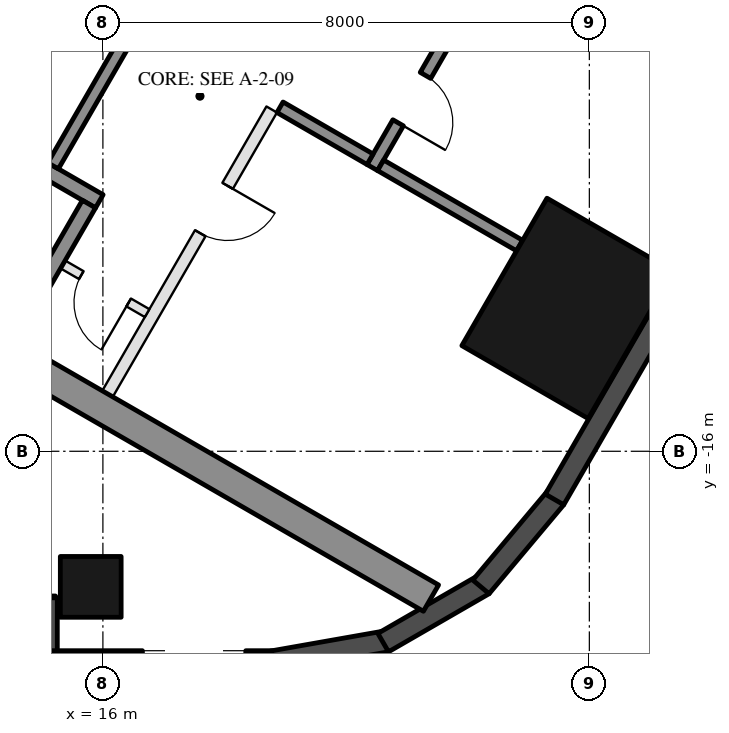
"""IFC4 building model, lengths in metres.
Left out: names, types, materials, properties, quantities, classifications, styles, units other than length and angle.
Written with IfcOpenShell. Run it as: python <this file> out.ifc"""

import sys

from ifc_helpers import new_model, si_unit, direction, frame, frame_2d, origin, origin_2d, place, context, subcontext, project, spatial, rectangle, hollow_rectangle, extrude, element, fill, save


model = new_model("IFC4")
c1 = context("Model", 3, precision=1e-05, world=origin(), true_north=direction((0.0, 1.0)))
c2 = subcontext(c1, "Body", "Model", "MODEL_VIEW")
j1 = project(units=[si_unit("LENGTHUNIT", "METRE"), si_unit("PLANEANGLEUNIT", "RADIAN")], contexts=[c1])
p1 = place(None, origin())
s1 = spatial("IfcSite", under=j1, at=p1, CompositionType="ELEMENT")
p2 = place(p1, origin())
s2 = spatial("IfcBuilding", under=s1, at=p2, CompositionType="ELEMENT")
p3 = place(p2, frame((0.0, 0.0, 46.5)))
s3 = spatial("IfcBuildingStorey", under=s2, at=p3, CompositionType="ELEMENT", Elevation=46.5)
p4 = place(p3, frame((15.8, -18.23, 0.0), z_axis=(0.0, 0.0, 1.0), x_axis=(-1.0, 0.0, 0.0)))
e1 = element("IfcColumn", 1, at=p4, inside=s3, PredefinedType="COLUMN", context=c2, shape_type="SweptSolid", body=[
    extrude(hollow_rectangle(XDim=1.0, YDim=1.0, WallThickness=0.045, at=origin_2d()), origin(), (0.0, 0.0, 1.0), 3.7),
])
p5 = place(p3, frame((23.643, -13.65, 0.0), z_axis=(0.0, 0.0, 1.0), x_axis=(0.5, 0.866025403784, 0.0)))
e2 = element("IfcColumn", 2, at=p5, inside=s3, PredefinedType="COLUMN", context=c2, shape_type="SweptSolid", body=[
    extrude(hollow_rectangle(XDim=2.8, YDim=2.4, WallThickness=0.07, at=origin_2d()), origin(), (0.0, 0.0, 1.0), 3.7),
])
p6 = place(p3, frame((8.48, -18.555, 0.0), z_axis=(0.0, 0.0, 1.0), x_axis=(1.0, 0.0, 0.0)))
e3 = element("IfcWall", 3, at=p6, inside=s3, PredefinedType="SOLIDWALL", context=c2, shape_type="SweptSolid", body=[
    extrude(rectangle(XDim=6.74, YDim=0.35, at=frame_2d((3.37, 0.0))), origin(), (0.0, 0.0, 1.0), 3.55),
])
p7 = place(p6, frame((0.77, 0.0, 0.0)))
e4 = element("IfcOpeningElement", 4, at=p7, cuts=e3, PredefinedType="OPENING", context=c2, shape_type="SweptSolid", body=[
    extrude(rectangle(XDim=2.4, YDim=2.4, at=frame_2d((1.2, 1.2))), frame((0.0, 0.185, 0.0), z_axis=(0.0, -1.0, 0.0), x_axis=(1.0, 0.0, 0.0)), (0.0, 0.0, 1.0), 0.37),
])
p8 = place(p6, frame((3.47, 0.0, 0.3)))
e5 = element("IfcOpeningElement", 5, at=p8, cuts=e3, PredefinedType="OPENING", context=c2, shape_type="SweptSolid", body=[
    extrude(rectangle(XDim=2.5, YDim=2.65, at=frame_2d((1.25, 1.325))), frame((0.0, 0.185, 0.0), z_axis=(0.0, -1.0, 0.0), x_axis=(1.0, 0.0, 0.0)), (0.0, 0.0, 1.0), 0.37),
])
p9 = place(p3, frame((15.075, -18.41, 0.0), z_axis=(0.0, 0.0, 1.0), x_axis=(0.0, -1.0, 0.0)))
e6 = element("IfcWall", 6, at=p9, inside=s3, PredefinedType="SOLIDWALL", context=c2, shape_type="SweptSolid", body=[
    extrude(rectangle(XDim=1.22, YDim=0.35, at=frame_2d((0.61, 0.0))), origin(), (0.0, 0.0, 1.0), 3.55),
])
p10 = place(p3, frame((14.9, -19.455, 0.0), z_axis=(0.0, 0.0, 1.0), x_axis=(1.0, 0.0, 0.0)))
e7 = element("IfcWall", 7, at=p10, inside=s3, PredefinedType="SOLIDWALL", context=c2, shape_type="SweptSolid", body=[
    extrude(rectangle(XDim=3.916, YDim=0.35, at=frame_2d((1.958, 0.0))), origin(), (0.0, 0.0, 1.0), 3.55),
])
p11 = place(p10, frame((1.75, 0.0, 0.3)))
e8 = element("IfcOpeningElement", 8, at=p11, cuts=e7, PredefinedType="OPENING", context=c2, shape_type="SweptSolid", body=[
    extrude(rectangle(XDim=1.7, YDim=2.65, at=frame_2d((0.85, 1.325))), frame((0.0, 0.185, 0.0), z_axis=(0.0, -1.0, 0.0), x_axis=(1.0, 0.0, 0.0)), (0.0, 0.0, 1.0), 0.37),
])
p12 = place(p3, frame((18.785, -19.458, 0.0), z_axis=(0.0, 0.0, 1.0), x_axis=(0.984798995425, 0.173697837091, 0.0)))
e9 = element("IfcWall", 9, at=p12, inside=s3, PredefinedType="SOLIDWALL", context=c2, shape_type="SweptSolid", body=[
    extrude(rectangle(XDim=1.91, YDim=0.35, at=frame_2d((0.955, 0.0))), origin(), (0.0, 0.0, 1.0), 3.55),
])
for number, where, z_axis, x_axis in (
    (10, (20.61, -19.147, 0.0), (0.0, 0.0, 1.0), (0.866, 0.5, 0.0)),
    (11, (22.217, -18.231, 0.0), (0.0, 0.0, 1.0), (0.643, 0.766, 0.0)),
):
    element("IfcWall", number, at=place(p3, frame(where, z_axis=z_axis, x_axis=x_axis)), inside=s3, PredefinedType="SOLIDWALL", context=c2, shape_type="SweptSolid", body=[
        extrude(rectangle(XDim=1.91, YDim=0.35, at=frame_2d((0.955, 0.0))), origin(), (0.0, 0.0, 1.0), 3.55),
    ])
p13 = place(p3, frame((23.427, -16.792, 0.0), z_axis=(0.0, 0.0, 1.0), x_axis=(0.500018773155, 0.866014564827, 0.0)))
e12 = element("IfcWall", 12, at=p13, inside=s3, PredefinedType="SOLIDWALL", context=c2, shape_type="SweptSolid", body=[
    extrude(rectangle(XDim=5.658, YDim=0.35, at=frame_2d((2.829, 0.0))), origin(), (0.0, 0.0, 1.0), 3.55),
])
for number, where, z_axis, x_axis in (
    (13, (8.547, -10.997, 0.0), (0.0, 0.0, 1.0), (0.866, -0.5, 0.0)),
    (14, (13.797, -1.903, 0.0), (0.0, 0.0, 1.0), (0.866, -0.5, 0.0)),
):
    element("IfcWall", number, at=place(p3, frame(where, z_axis=z_axis, x_axis=x_axis)), inside=s3, PredefinedType="SHEAR", context=c2, shape_type="SweptSolid", body=[
        extrude(rectangle(XDim=14.837, YDim=0.5, at=frame_2d((7.418, 0.0))), origin(), (0.0, 0.0, 1.0), 3.5),
    ])
p14 = place(p3, frame((10.356, -8.664, 0.0), z_axis=(0.0, 0.0, 1.0), x_axis=(0.866028629588, -0.499994412703, 0.0)))
e15 = element("IfcWall", 15, at=p14, inside=s3, PredefinedType="SHEAR", context=c2, shape_type="SweptSolid", body=[
    extrude(rectangle(XDim=6.45, YDim=0.25, at=frame_2d((3.225, 0.0))), origin(), (0.0, 0.0, 1.0), 3.5),
])
p15 = place(p14, frame((0.3, 0.0, 0.0)))
e16 = element("IfcOpeningElement", 16, at=p15, cuts=e15, PredefinedType="OPENING", context=c2, shape_type="SweptSolid", body=[
    extrude(rectangle(XDim=1.0, YDim=2.1, at=frame_2d((0.5, 1.05))), frame((0.0, 0.135, 0.0), z_axis=(0.0, -1.0, 0.0), x_axis=(1.0, 0.0, 0.0)), (0.0, 0.0, 1.0), 0.27),
])
p16 = place(p3, frame((14.496, -14.143, 0.0), z_axis=(0.0, 0.0, 1.0), x_axis=(0.500062241894, 0.865989465428, 0.0)))
e17 = element("IfcWall", 17, at=p16, inside=s3, PredefinedType="SHEAR", context=c2, shape_type="SweptSolid", body=[
    extrude(rectangle(XDim=2.55, YDim=0.25, at=frame_2d((1.275, 0.0))), origin(), (0.0, 0.0, 1.0), 3.5),
])
p17 = place(p3, frame((15.181, -11.305, 0.0), z_axis=(0.0, 0.0, 1.0), x_axis=(0.49994636267, 0.866056369097, 0.0)))
e18 = element("IfcWall", 18, at=p17, inside=s3, PredefinedType="SHEAR", context=c2, shape_type="SweptSolid", body=[
    extrude(rectangle(XDim=2.8, YDim=0.2, at=frame_2d((1.4, 0.0))), origin(), (0.0, 0.0, 1.0), 3.5),
])
p18 = place(p3, frame((20.43, -11.333, 0.0), z_axis=(0.0, 0.0, 1.0), x_axis=(0.500001309137, 0.866024647952, 0.0)))
e19 = element("IfcWall", 19, at=p18, inside=s3, PredefinedType="SHEAR", context=c2, shape_type="SweptSolid", body=[
    extrude(rectangle(XDim=2.4, YDim=0.2, at=frame_2d((1.2, 0.0))), origin(), (0.0, 0.0, 1.0), 3.5),
])
p19 = place(p18, frame((0.85, 0.0, 0.0)))
e20 = element("IfcOpeningElement", 20, at=p19, cuts=e19, PredefinedType="OPENING", context=c2, shape_type="SweptSolid", body=[
    extrude(rectangle(XDim=0.9, YDim=2.1, at=frame_2d((0.45, 1.05))), frame((0.0, 0.11, 0.0), z_axis=(0.0, -1.0, 0.0), x_axis=(1.0, 0.0, 0.0)), (0.0, 0.0, 1.0), 0.22),
])
p20 = place(p3, frame((18.913, -10.342, 0.0), z_axis=(0.0, 0.0, 1.0), x_axis=(0.866038183914, -0.499977863513, 0.0)))
e21 = element("IfcWall", 21, at=p20, inside=s3, PredefinedType="SHEAR", context=c2, shape_type="SweptSolid", body=[
    extrude(rectangle(XDim=1.71, YDim=0.2, at=frame_2d((0.855, 0.0))), origin(), (0.0, 0.0, 1.0), 3.5),
])
p21 = place(p3, frame((20.567, -11.297, 0.0), z_axis=(0.0, 0.0, 1.0), x_axis=(0.866060851709, -0.499938597367, 0.0)))
e22 = element("IfcWall", 22, at=p21, inside=s3, PredefinedType="SHEAR", context=c2, shape_type="SweptSolid", body=[
    extrude(rectangle(XDim=2.64, YDim=0.2, at=frame_2d((1.32, 0.0))), origin(), (0.0, 0.0, 1.0), 3.5),
])
p22 = place(p3, frame((16.076, -15.055, 0.0), z_axis=(0.0, 0.0, 1.0), x_axis=(0.499995103361, 0.866028230842, 0.0)))
e23 = element("IfcWall", 23, at=p22, inside=s3, PredefinedType="PARTITIONING", context=c2, shape_type="SweptSolid", body=[
    extrude(rectangle(XDim=5.4, YDim=0.2, at=frame_2d((2.7, 0.0))), origin(), (0.0, 0.0, 1.0), 3.5),
])
p23 = place(p22, frame((3.05, 0.0, 0.0)))
e24 = element("IfcOpeningElement", 24, at=p23, cuts=e23, PredefinedType="OPENING", context=c2, shape_type="SweptSolid", body=[
    extrude(rectangle(XDim=0.9, YDim=2.1, at=frame_2d((0.45, 1.05))), frame((0.0, 0.11, 0.0), z_axis=(0.0, -1.0, 0.0), x_axis=(1.0, 0.0, 0.0)), (0.0, 0.0, 1.0), 0.22),
])
p24 = place(p3, frame((15.342, -12.928, 0.0), z_axis=(0.0, 0.0, 1.0), x_axis=(0.865989903783, -0.500061482766, 0.0)))
e25 = element("IfcWall", 25, at=p24, inside=s3, PredefinedType="PARTITIONING", context=c2, shape_type="SweptSolid", body=[
    extrude(rectangle(XDim=1.6, YDim=0.15, at=frame_2d((0.8, 0.0))), origin(), (0.0, 0.0, 1.0), 3.5),
])
p25 = place(p24, frame((0.35, 0.0, 0.0)))
e26 = element("IfcOpeningElement", 26, at=p25, cuts=e25, PredefinedType="OPENING", context=c2, shape_type="SweptSolid", body=[
    extrude(rectangle(XDim=0.9, YDim=2.1, at=frame_2d((0.45, 1.05))), frame((0.0, 0.085, 0.0), z_axis=(0.0, -1.0, 0.0), x_axis=(1.0, 0.0, 0.0)), (0.0, 0.0, 1.0), 0.17),
])
p26 = place(p25, frame((0.9, 0.0, 0.0), z_axis=(0.0, 0.0, 1.0), x_axis=(-1.0, 0.0, 0.0)))
e27 = element("IfcDoor", 27, at=p26, inside=s3, OperationType="SINGLE_SWING_LEFT", PredefinedType="DOOR", context=c2, shape_type="SweptSolid", body=[
    extrude(rectangle(XDim=0.9, YDim=2.1, at=frame_2d((0.45, 1.05))), frame((0.0, 0.025, 0.0), z_axis=(0.0, -1.0, 0.0), x_axis=(1.0, 0.0, 0.0)), (0.0, 0.0, 1.0), 0.05),
])
fill(e26, e27)
p27 = place(p19, frame((0.9, 0.0, 0.0), z_axis=(0.0, 0.0, 1.0), x_axis=(-1.0, 0.0, 0.0)))
e28 = element("IfcDoor", 28, at=p27, inside=s3, OperationType="SINGLE_SWING_RIGHT", PredefinedType="DOOR", context=c2, shape_type="SweptSolid", body=[
    extrude(rectangle(XDim=0.9, YDim=2.1, at=frame_2d((0.45, 1.05))), frame((0.0, 0.025, 0.0), z_axis=(0.0, -1.0, 0.0), x_axis=(1.0, 0.0, 0.0)), (0.0, 0.0, 1.0), 0.05),
])
fill(e20, e28)
p28 = place(p23, frame((0.9, 0.0, 0.0), z_axis=(0.0, 0.0, 1.0), x_axis=(-1.0, 0.0, 0.0)))
e29 = element("IfcDoor", 29, at=p28, inside=s3, OperationType="SINGLE_SWING_LEFT", PredefinedType="DOOR", context=c2, shape_type="SweptSolid", body=[
    extrude(rectangle(XDim=0.9, YDim=2.1, at=frame_2d((0.45, 1.05))), frame((0.0, 0.025, 0.0), z_axis=(0.0, -1.0, 0.0), x_axis=(1.0, 0.0, 0.0)), (0.0, 0.0, 1.0), 0.05),
])
fill(e24, e29)
save(model, sys.argv[1])
